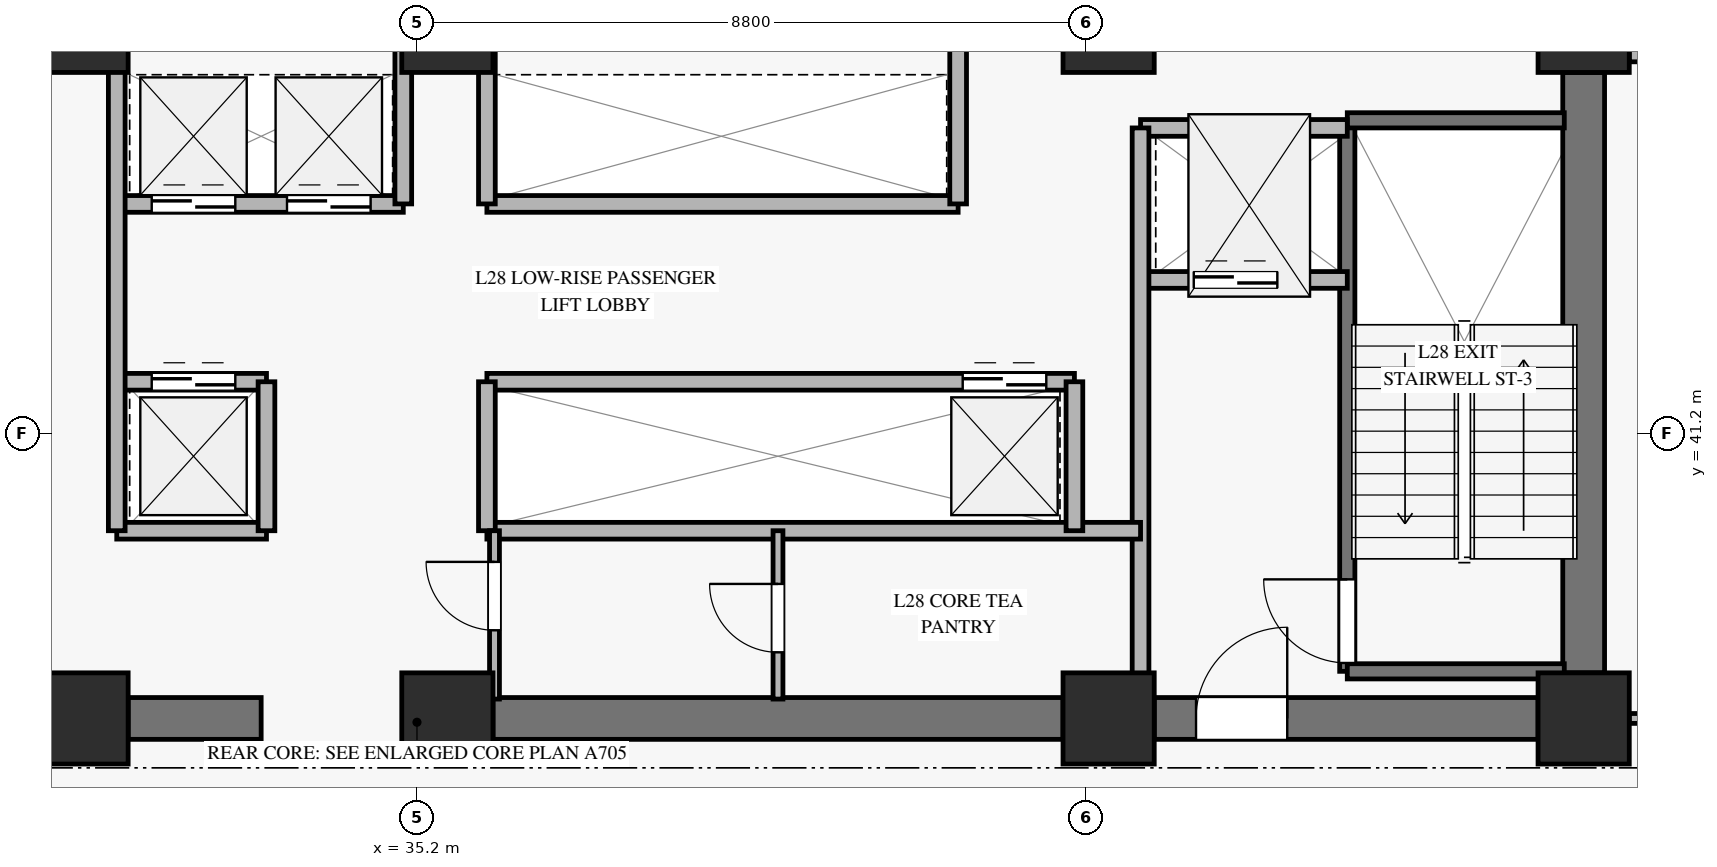
"""IFC4 building model, lengths in metres.
Left out: names, types, materials, properties, quantities, classifications, styles, units other than length and angle.
Written with IfcOpenShell. Run it as: python <this file> out.ifc"""

import sys

from ifc_helpers import new_model, si_unit, direction, frame, frame_2d, origin, origin_2d, place, context, subcontext, project, spatial, rectangle, extrude, source, transform, mapped, element, fill, save


model = new_model("IFC4")
c1 = context("Model", 3, precision=1e-05, world=origin(), true_north=direction((0.0, 1.0)))
c2 = subcontext(c1, "Body", "Model", "MODEL_VIEW")
j1 = project(units=[si_unit("LENGTHUNIT", "METRE"), si_unit("PLANEANGLEUNIT", "RADIAN")], contexts=[c1])
p1 = place(None, origin())
s1 = spatial("IfcSite", under=j1, at=p1, CompositionType="ELEMENT")
p2 = place(p1, origin())
s2 = spatial("IfcBuilding", under=s1, at=p2, CompositionType="ELEMENT")
p3 = place(p2, frame((0.0, 0.0, 115.3)))
s3 = spatial("IfcBuildingStorey", under=s2, at=p3, CompositionType="ELEMENT", Elevation=115.3)
m1 = source(origin(), c2, "Body", "SweptSolid", [
    extrude(rectangle(XDim=1.2, YDim=1.2, at=origin_2d()), origin(), (0.0, 0.0, 1.0), 3.68),
])
for number, where, z_axis, x_axis in (
    (1, (30.8, 37.45, 0.0), (0.0, 0.0, 1.0), (1.0, 0.0, 0.0)),
    (2, (30.8, 46.55, 0.0), (0.0, 0.0, 1.0), (1.0, 0.0, 0.0)),
    (3, (35.6, 37.45, 0.0), (0.0, 0.0, 1.0), (1.0, 0.0, 0.0)),
    (4, (35.6, 46.55, 0.0), (0.0, 0.0, 1.0), (1.0, 0.0, 0.0)),
    (5, (44.3, 37.45, 0.0), (0.0, 0.0, 1.0), (1.0, 0.0, 0.0)),
    (6, (44.3, 46.55, 0.0), (0.0, 0.0, 1.0), (1.0, 0.0, 0.0)),
    (7, (50.55, 37.45, 0.0), (0.0, 0.0, 1.0), (1.0, 0.0, 0.0)),
    (8, (50.55, 46.55, 0.0), (0.0, 0.0, 1.0), (1.0, 0.0, 0.0)),
):
    element("IfcColumn", number, at=place(p3, frame(where, z_axis=z_axis, x_axis=x_axis)), inside=s3, PredefinedType="PILASTER", context=c2, shape_type="MappedRepresentation", body=[
        mapped(m1, transform((0.0, 0.0, 0.0), x_axis=(1.0, 0.0, 0.0), y_axis=(0.0, 1.0, 0.0), z_axis=(0.0, 0.0, 1.0), scale=1.0)),
    ])
p4 = place(p3, frame((31.4, 37.45, 0.0), z_axis=(0.0, 0.0, 1.0), x_axis=(1.0, 0.0, 0.0)))
e9 = element("IfcWall", 9, at=p4, inside=s3, PredefinedType="SHEAR", context=c2, shape_type="SweptSolid", body=[
    extrude(rectangle(XDim=1.75, YDim=0.55, at=frame_2d((0.875, 0.0))), origin(), (0.0, 0.0, 1.0), 3.68),
])
p5 = place(p3, frame((36.2, 37.45, 0.0), z_axis=(0.0, 0.0, 1.0), x_axis=(1.0, 0.0, 0.0)))
e10 = element("IfcWall", 10, at=p5, inside=s3, PredefinedType="SHEAR", context=c2, shape_type="SweptSolid", body=[
    extrude(rectangle(XDim=7.5, YDim=0.55, at=frame_2d((3.75, 0.0))), origin(), (0.0, 0.0, 1.0), 3.68),
])
p6 = place(p3, frame((44.9, 37.45, 0.0), z_axis=(0.0, 0.0, 1.0), x_axis=(1.0, 0.0, 0.0)))
e11 = element("IfcWall", 11, at=p6, inside=s3, PredefinedType="SHEAR", context=c2, shape_type="SweptSolid", body=[
    extrude(rectangle(XDim=5.05, YDim=0.55, at=frame_2d((2.525, 0.0))), origin(), (0.0, 0.0, 1.0), 3.68),
])
p7 = place(p6, frame((0.55, 0.0, 0.0)))
e12 = element("IfcOpeningElement", 12, at=p7, cuts=e11, PredefinedType="OPENING", context=c2, shape_type="SweptSolid", body=[
    extrude(rectangle(XDim=1.2, YDim=2.15, at=frame_2d((0.6, 1.075))), frame((0.0, 0.285, 0.0), z_axis=(0.0, -1.0, 0.0), x_axis=(1.0, 0.0, 0.0)), (0.0, 0.0, 1.0), 0.57),
])
p8 = place(p3, frame((50.55, 38.05, 0.0), z_axis=(0.0, 0.0, 1.0), x_axis=(0.0, 1.0, 0.0)))
e13 = element("IfcWall", 13, at=p8, inside=s3, PredefinedType="SHEAR", context=c2, shape_type="SweptSolid", body=[
    extrude(rectangle(XDim=7.9, YDim=0.55, at=frame_2d((3.95, 0.0))), origin(), (0.0, 0.0, 1.0), 3.68),
])
p9 = place(p3, frame((51.15, 46.25, 0.0), z_axis=(0.0, 0.0, 1.0), x_axis=(1.0, 0.0, 0.0)))
e14 = element("IfcWall", 14, at=p9, inside=s3, PredefinedType="SOLIDWALL", context=c2, shape_type="SweptSolid", body=[
    extrude(rectangle(XDim=11.039, YDim=0.32, at=frame_2d((5.52, 0.0))), origin(), (0.0, 0.0, 1.0), 3.16),
])
p10 = place(p9, frame((4.72, 0.0, 0.45)))
e15 = element("IfcOpeningElement", 15, at=p10, cuts=e14, PredefinedType="OPENING", context=c2, shape_type="SweptSolid", body=[
    extrude(rectangle(XDim=1.6, YDim=2.0, at=frame_2d((0.8, 1.0))), frame((0.0, 0.17, 0.0), z_axis=(0.0, -1.0, 0.0), x_axis=(1.0, 0.0, 0.0)), (0.0, 0.0, 1.0), 0.34),
])
p11 = place(p3, frame((47.44, 38.07, 0.0), z_axis=(0.0, 0.0, 1.0), x_axis=(0.0, 1.0, 0.0)))
e16 = element("IfcWall", 16, at=p11, inside=s3, PredefinedType="SOLIDWALL", context=c2, shape_type="SweptSolid", body=[
    extrude(rectangle(XDim=7.25, YDim=0.2, at=frame_2d((3.625, 0.0))), origin(), (0.0, 0.0, 1.0), 3.9),
])
p12 = place(p11, frame((0.11, 0.0, 0.0)))
e17 = element("IfcOpeningElement", 17, at=p12, cuts=e16, PredefinedType="OPENING", context=c2, shape_type="SweptSolid", body=[
    extrude(rectangle(XDim=1.1, YDim=2.15, at=frame_2d((0.55, 1.075))), frame((0.0, 0.11, 0.0), z_axis=(0.0, -1.0, 0.0), x_axis=(1.0, 0.0, 0.0)), (0.0, 0.0, 1.0), 0.22),
])
for number, where, z_axis, x_axis in (
    (18, (47.44, 45.32, 0.0), (0.0, 0.0, 1.0), (1.0, 0.0, 0.0)),
    (19, (47.44, 38.07, 0.0), (0.0, 0.0, 1.0), (1.0, 0.0, 0.0)),
):
    element("IfcWall", number, at=place(p3, frame(where, z_axis=z_axis, x_axis=x_axis)), inside=s3, PredefinedType="SOLIDWALL", context=c2, shape_type="SweptSolid", body=[
        extrude(rectangle(XDim=2.855, YDim=0.2, at=frame_2d((1.427, 0.0))), origin(), (0.0, 0.0, 1.0), 3.9),
    ])
p13 = place(p3, frame((44.72, 43.22, 0.0), z_axis=(0.0, 0.0, 1.0), x_axis=(1.0, 0.0, 0.0)))
e20 = element("IfcWall", 20, at=p13, inside=s3, PredefinedType="SOLIDWALL", context=c2, shape_type="SweptSolid", body=[
    extrude(rectangle(XDim=2.72, YDim=0.22, at=frame_2d((1.36, 0.0))), origin(), (0.0, 0.0, 1.0), 3.68),
])
p14 = place(p13, frame((0.7, 0.0, 0.0)))
e21 = element("IfcOpeningElement", 21, at=p14, cuts=e20, PredefinedType="OPENING", context=c2, shape_type="SweptSolid", body=[
    extrude(rectangle(XDim=1.1, YDim=2.2, at=frame_2d((0.55, 1.1))), frame((0.0, 0.12, 0.0), z_axis=(0.0, -1.0, 0.0), x_axis=(1.0, 0.0, 0.0)), (0.0, 0.0, 1.0), 0.24),
])
p15 = place(p3, frame((44.72, 45.22, 0.0), z_axis=(0.0, 0.0, 1.0), x_axis=(1.0, 0.0, 0.0)))
e22 = element("IfcWall", 22, at=p15, inside=s3, PredefinedType="SOLIDWALL", context=c2, shape_type="SweptSolid", body=[
    extrude(rectangle(XDim=2.72, YDim=0.22, at=frame_2d((1.36, 0.0))), origin(), (0.0, 0.0, 1.0), 3.68),
])
p16 = place(p3, frame((44.72, 37.705, 0.0), z_axis=(0.0, 0.0, 1.0), x_axis=(0.0, 1.0, 0.0)))
e23 = element("IfcWall", 23, at=p16, inside=s3, PredefinedType="SOLIDWALL", context=c2, shape_type="SweptSolid", body=[
    extrude(rectangle(XDim=7.515, YDim=0.22, at=frame_2d((3.757, 0.0))), origin(), (0.0, 0.0, 1.0), 3.68),
])
p17 = place(p3, frame((31.25, 44.22, 0.0), z_axis=(0.0, 0.0, 1.0), x_axis=(1.0, 0.0, 0.0)))
e24 = element("IfcWall", 24, at=p17, inside=s3, PredefinedType="SOLIDWALL", context=c2, shape_type="SweptSolid", body=[
    extrude(rectangle(XDim=3.77, YDim=0.22, at=frame_2d((1.885, 0.0))), origin(), (0.0, 0.0, 1.0), 3.68),
])
p18 = place(p17, frame((0.46, 0.0, 0.0)))
e25 = element("IfcOpeningElement", 25, at=p18, cuts=e24, PredefinedType="OPENING", context=c2, shape_type="SweptSolid", body=[
    extrude(rectangle(XDim=1.1, YDim=2.2, at=frame_2d((0.55, 1.1))), frame((0.0, 0.12, 0.0), z_axis=(0.0, -1.0, 0.0), x_axis=(1.0, 0.0, 0.0)), (0.0, 0.0, 1.0), 0.24),
])
p19 = place(p17, frame((2.24, 0.0, 0.0)))
e26 = element("IfcOpeningElement", 26, at=p19, cuts=e24, PredefinedType="OPENING", context=c2, shape_type="SweptSolid", body=[
    extrude(rectangle(XDim=1.1, YDim=2.2, at=frame_2d((0.55, 1.1))), frame((0.0, 0.12, 0.0), z_axis=(0.0, -1.0, 0.0), x_axis=(1.0, 0.0, 0.0)), (0.0, 0.0, 1.0), 0.24),
])
p20 = place(p3, frame((36.12, 44.22, 0.0), z_axis=(0.0, 0.0, 1.0), x_axis=(1.0, 0.0, 0.0)))
e27 = element("IfcWall", 27, at=p20, inside=s3, PredefinedType="SOLIDWALL", context=c2, shape_type="SweptSolid", body=[
    extrude(rectangle(XDim=6.2, YDim=0.22, at=frame_2d((3.1, 0.0))), origin(), (0.0, 0.0, 1.0), 3.68),
])
for number, where, z_axis, x_axis in (
    (28, (35.02, 44.22, 0.0), (0.0, 0.0, 1.0), (0.0, 1.0, 0.0)),
    (29, (36.12, 44.22, 0.0), (0.0, 0.0, 1.0), (0.0, 1.0, 0.0)),
    (30, (42.32, 44.22, 0.0), (0.0, 0.0, 1.0), (0.0, 1.0, 0.0)),
):
    element("IfcWall", number, at=place(p3, frame(where, z_axis=z_axis, x_axis=x_axis)), inside=s3, PredefinedType="SOLIDWALL", context=c2, shape_type="SweptSolid", body=[
        extrude(rectangle(XDim=2.075, YDim=0.22, at=frame_2d((1.038, 0.0))), origin(), (0.0, 0.0, 1.0), 3.68),
    ])
p21 = place(p3, frame((31.25, 41.88, 0.0), z_axis=(0.0, 0.0, 1.0), x_axis=(1.0, 0.0, 0.0)))
e31 = element("IfcWall", 31, at=p21, inside=s3, PredefinedType="SOLIDWALL", context=c2, shape_type="SweptSolid", body=[
    extrude(rectangle(XDim=1.97, YDim=0.22, at=frame_2d((0.985, 0.0))), origin(), (0.0, 0.0, 1.0), 3.68),
])
p22 = place(p21, frame((0.46, 0.0, 0.0)))
e32 = element("IfcOpeningElement", 32, at=p22, cuts=e31, PredefinedType="OPENING", context=c2, shape_type="SweptSolid", body=[
    extrude(rectangle(XDim=1.1, YDim=2.2, at=frame_2d((0.55, 1.1))), frame((0.0, 0.12, 0.0), z_axis=(0.0, -1.0, 0.0), x_axis=(1.0, 0.0, 0.0)), (0.0, 0.0, 1.0), 0.24),
])
p23 = place(p3, frame((36.12, 41.88, 0.0), z_axis=(0.0, 0.0, 1.0), x_axis=(1.0, 0.0, 0.0)))
e33 = element("IfcWall", 33, at=p23, inside=s3, PredefinedType="SOLIDWALL", context=c2, shape_type="SweptSolid", body=[
    extrude(rectangle(XDim=7.73, YDim=0.22, at=frame_2d((3.865, 0.0))), origin(), (0.0, 0.0, 1.0), 3.68),
])
p24 = place(p23, frame((6.26, 0.0, 0.0)))
e34 = element("IfcOpeningElement", 34, at=p24, cuts=e33, PredefinedType="OPENING", context=c2, shape_type="SweptSolid", body=[
    extrude(rectangle(XDim=1.1, YDim=2.2, at=frame_2d((0.55, 1.1))), frame((0.0, 0.12, 0.0), z_axis=(0.0, -1.0, 0.0), x_axis=(1.0, 0.0, 0.0)), (0.0, 0.0, 1.0), 0.24),
])
p25 = place(p3, frame((31.25, 39.92, 0.0), z_axis=(0.0, 0.0, 1.0), x_axis=(1.0, 0.0, 0.0)))
e35 = element("IfcWall", 35, at=p25, inside=s3, PredefinedType="SOLIDWALL", context=c2, shape_type="SweptSolid", body=[
    extrude(rectangle(XDim=1.97, YDim=0.22, at=frame_2d((0.985, 0.0))), origin(), (0.0, 0.0, 1.0), 3.68),
])
p26 = place(p3, frame((33.22, 39.92, 0.0), z_axis=(0.0, 0.0, 1.0), x_axis=(0.0, 1.0, 0.0)))
e36 = element("IfcWall", 36, at=p26, inside=s3, PredefinedType="SOLIDWALL", context=c2, shape_type="SweptSolid", body=[
    extrude(rectangle(XDim=1.96, YDim=0.22, at=frame_2d((0.98, 0.0))), origin(), (0.0, 0.0, 1.0), 3.68),
])
p27 = place(p3, frame((36.12, 39.92, 0.0), z_axis=(0.0, 0.0, 1.0), x_axis=(1.0, 0.0, 0.0)))
e37 = element("IfcWall", 37, at=p27, inside=s3, PredefinedType="SOLIDWALL", context=c2, shape_type="SweptSolid", body=[
    extrude(rectangle(XDim=8.6, YDim=0.22, at=frame_2d((4.3, 0.0))), origin(), (0.0, 0.0, 1.0), 2.965),
])
p28 = place(p3, frame((36.12, 39.92, 0.0), z_axis=(0.0, 0.0, 1.0), x_axis=(0.0, 1.0, 0.0)))
e38 = element("IfcWall", 38, at=p28, inside=s3, PredefinedType="SOLIDWALL", context=c2, shape_type="SweptSolid", body=[
    extrude(rectangle(XDim=1.96, YDim=0.22, at=frame_2d((0.98, 0.0))), origin(), (0.0, 0.0, 1.0), 3.68),
])
p29 = place(p3, frame((31.25, 39.92, 0.0), z_axis=(0.0, 0.0, 1.0), x_axis=(0.0, 1.0, 0.0)))
e39 = element("IfcWall", 39, at=p29, inside=s3, PredefinedType="SOLIDWALL", context=c2, shape_type="SweptSolid", body=[
    extrude(rectangle(XDim=6.375, YDim=0.22, at=frame_2d((3.188, 0.0))), origin(), (0.0, 0.0, 1.0), 3.68),
])
p30 = place(p3, frame((43.85, 39.92, 0.0), z_axis=(0.0, 0.0, 1.0), x_axis=(0.0, 1.0, 0.0)))
e40 = element("IfcWall", 40, at=p30, inside=s3, PredefinedType="SOLIDWALL", context=c2, shape_type="SweptSolid", body=[
    extrude(rectangle(XDim=1.96, YDim=0.22, at=frame_2d((0.98, 0.0))), origin(), (0.0, 0.0, 1.0), 3.68),
])
p31 = place(p3, frame((36.22, 37.705, 0.0), z_axis=(0.0, 0.0, 1.0), x_axis=(0.0, 1.0, 0.0)))
e41 = element("IfcWall", 41, at=p31, inside=s3, PredefinedType="PARTITIONING", context=c2, shape_type="SweptSolid", body=[
    extrude(rectangle(XDim=2.215, YDim=0.13, at=frame_2d((1.107, 0.0))), origin(), (0.0, 0.0, 1.0), 3.68),
])
p32 = place(p31, frame((0.905, 0.0, 0.0)))
e42 = element("IfcOpeningElement", 42, at=p32, cuts=e41, PredefinedType="OPENING", context=c2, shape_type="SweptSolid", body=[
    extrude(rectangle(XDim=0.9, YDim=2.1, at=frame_2d((0.45, 1.05))), frame((0.0, 0.075, 0.0), z_axis=(0.0, -1.0, 0.0), x_axis=(1.0, 0.0, 0.0)), (0.0, 0.0, 1.0), 0.15),
])
p33 = place(p3, frame((39.95, 37.705, 0.0), z_axis=(0.0, 0.0, 1.0), x_axis=(0.0, 1.0, 0.0)))
e43 = element("IfcWall", 43, at=p33, inside=s3, PredefinedType="PARTITIONING", context=c2, shape_type="SweptSolid", body=[
    extrude(rectangle(XDim=2.215, YDim=0.13, at=frame_2d((1.107, 0.0))), origin(), (0.0, 0.0, 1.0), 3.68),
])
p34 = place(p33, frame((0.615, 0.0, 0.0)))
e44 = element("IfcOpeningElement", 44, at=p34, cuts=e43, PredefinedType="OPENING", context=c2, shape_type="SweptSolid", body=[
    extrude(rectangle(XDim=0.9, YDim=2.1, at=frame_2d((0.45, 1.05))), frame((0.0, 0.075, 0.0), z_axis=(0.0, -1.0, 0.0), x_axis=(1.0, 0.0, 0.0)), (0.0, 0.0, 1.0), 0.15),
])
p35 = place(p3, frame((51.15, 37.45, 0.0), z_axis=(0.0, 0.0, 1.0), x_axis=(1.0, 0.0, 0.0)))
e45 = element("IfcWall", 45, at=p35, inside=s3, PredefinedType="PARTITIONING", context=c2, shape_type="SweptSolid", body=[
    extrude(rectangle(XDim=14.506, YDim=0.13, at=frame_2d((7.253, 0.0))), origin(), (0.0, 0.0, 1.0), 3.165),
])
p36 = place(p35, frame((0.5, 0.0, 0.0)))
e46 = element("IfcOpeningElement", 46, at=p36, cuts=e45, PredefinedType="OPENING", context=c2, shape_type="SweptSolid", body=[
    extrude(rectangle(XDim=0.9, YDim=2.1, at=frame_2d((0.45, 1.05))), frame((0.0, 0.075, 0.0), z_axis=(0.0, -1.0, 0.0), x_axis=(1.0, 0.0, 0.0)), (0.0, 0.0, 1.0), 0.15),
])
p37 = place(p35, frame((10.594, 0.0, 0.0)))
e47 = element("IfcOpeningElement", 47, at=p37, cuts=e45, PredefinedType="OPENING", context=c2, shape_type="SweptSolid", body=[
    extrude(rectangle(XDim=0.95, YDim=2.1, at=frame_2d((0.475, 1.05))), frame((0.0, 0.075, 0.0), z_axis=(0.0, -1.0, 0.0), x_axis=(1.0, 0.0, 0.0)), (0.0, 0.0, 1.0), 0.15),
])
m2 = source(origin(), c2, "Body", "SweptSolid", [
    extrude(rectangle(XDim=1.1, YDim=2.15, at=frame_2d((0.55, 1.075))), frame((0.0, 0.025, 0.0), z_axis=(0.0, -1.0, 0.0), x_axis=(1.0, 0.0, 0.0)), (0.0, 0.0, 1.0), 0.05),
])
p38 = place(p12, origin())
e48 = element("IfcDoor", 48, at=p38, inside=s3, OperationType="SINGLE_SWING_RIGHT", PredefinedType="DOOR", context=c2, shape_type="MappedRepresentation", body=[
    mapped(m2, transform((0.0, 0.0, 0.0), x_axis=(1.0, 0.0, 0.0), y_axis=(0.0, 1.0, 0.0), z_axis=(0.0, 0.0, 1.0), scale=1.0)),
])
fill(e17, e48)
m3 = source(origin(), c2, "Body", "SweptSolid", [
    extrude(rectangle(XDim=1.1, YDim=2.2, at=frame_2d((0.55, 1.1))), frame((0.0, 0.025, 0.0), z_axis=(0.0, -1.0, 0.0), x_axis=(1.0, 0.0, 0.0)), (0.0, 0.0, 1.0), 0.05),
])
p39 = place(p14, origin())
e49 = element("IfcDoor", 49, at=p39, inside=s3, OperationType="SLIDING_TO_LEFT", PredefinedType="DOOR", context=c2, shape_type="MappedRepresentation", body=[
    mapped(m3, transform((0.0, 0.0, 0.0), x_axis=(1.0, 0.0, 0.0), y_axis=(0.0, 1.0, 0.0), z_axis=(0.0, 0.0, 1.0), scale=1.0)),
])
fill(e21, e49)
m4 = source(origin(), c2, "Body", "SweptSolid", [
    extrude(rectangle(XDim=1.2, YDim=2.15, at=frame_2d((0.6, 1.075))), frame((0.0, 0.025, 0.0), z_axis=(0.0, -1.0, 0.0), x_axis=(1.0, 0.0, 0.0)), (0.0, 0.0, 1.0), 0.05),
])
p40 = place(p7, origin())
e50 = element("IfcDoor", 50, at=p40, inside=s3, OperationType="SINGLE_SWING_RIGHT", PredefinedType="DOOR", context=c2, shape_type="MappedRepresentation", body=[
    mapped(m4, transform((0.0, 0.0, 0.0), x_axis=(1.0, 0.0, 0.0), y_axis=(0.0, 1.0, 0.0), z_axis=(0.0, 0.0, 1.0), scale=1.0)),
])
fill(e12, e50)
p41 = place(p18, origin())
e51 = element("IfcDoor", 51, at=p41, inside=s3, OperationType="SLIDING_TO_LEFT", PredefinedType="DOOR", context=c2, shape_type="MappedRepresentation", body=[
    mapped(m3, transform((0.0, 0.0, 0.0), x_axis=(1.0, 0.0, 0.0), y_axis=(0.0, 1.0, 0.0), z_axis=(0.0, 0.0, 1.0), scale=1.0)),
])
fill(e25, e51)
p42 = place(p19, origin())
e52 = element("IfcDoor", 52, at=p42, inside=s3, OperationType="SLIDING_TO_LEFT", PredefinedType="DOOR", context=c2, shape_type="MappedRepresentation", body=[
    mapped(m3, transform((0.0, 0.0, 0.0), x_axis=(1.0, 0.0, 0.0), y_axis=(0.0, 1.0, 0.0), z_axis=(0.0, 0.0, 1.0), scale=1.0)),
])
fill(e26, e52)
p43 = place(p22, origin())
e53 = element("IfcDoor", 53, at=p43, inside=s3, OperationType="SLIDING_TO_LEFT", PredefinedType="DOOR", context=c2, shape_type="MappedRepresentation", body=[
    mapped(m3, transform((0.0, 0.0, 0.0), x_axis=(1.0, 0.0, 0.0), y_axis=(0.0, 1.0, 0.0), z_axis=(0.0, 0.0, 1.0), scale=1.0)),
])
fill(e32, e53)
p44 = place(p24, origin())
e54 = element("IfcDoor", 54, at=p44, inside=s3, OperationType="SLIDING_TO_LEFT", PredefinedType="DOOR", context=c2, shape_type="MappedRepresentation", body=[
    mapped(m3, transform((0.0, 0.0, 0.0), x_axis=(1.0, 0.0, 0.0), y_axis=(0.0, 1.0, 0.0), z_axis=(0.0, 0.0, 1.0), scale=1.0)),
])
fill(e34, e54)
m5 = source(origin(), c2, "Body", "SweptSolid", [
    extrude(rectangle(XDim=0.9, YDim=2.1, at=frame_2d((0.45, 1.05))), frame((0.0, 0.025, 0.0), z_axis=(0.0, -1.0, 0.0), x_axis=(1.0, 0.0, 0.0)), (0.0, 0.0, 1.0), 0.05),
])
p45 = place(p32, origin())
e55 = element("IfcDoor", 55, at=p45, inside=s3, OperationType="SINGLE_SWING_RIGHT", PredefinedType="DOOR", context=c2, shape_type="MappedRepresentation", body=[
    mapped(m5, transform((0.0, 0.0, 0.0), x_axis=(1.0, 0.0, 0.0), y_axis=(0.0, 1.0, 0.0), z_axis=(0.0, 0.0, 1.0), scale=1.0)),
])
fill(e42, e55)
p46 = place(p34, origin())
e56 = element("IfcDoor", 56, at=p46, inside=s3, OperationType="SINGLE_SWING_RIGHT", PredefinedType="DOOR", context=c2, shape_type="MappedRepresentation", body=[
    mapped(m5, transform((0.0, 0.0, 0.0), x_axis=(1.0, 0.0, 0.0), y_axis=(0.0, 1.0, 0.0), z_axis=(0.0, 0.0, 1.0), scale=1.0)),
])
fill(e44, e56)
save(model, sys.argv[1])
